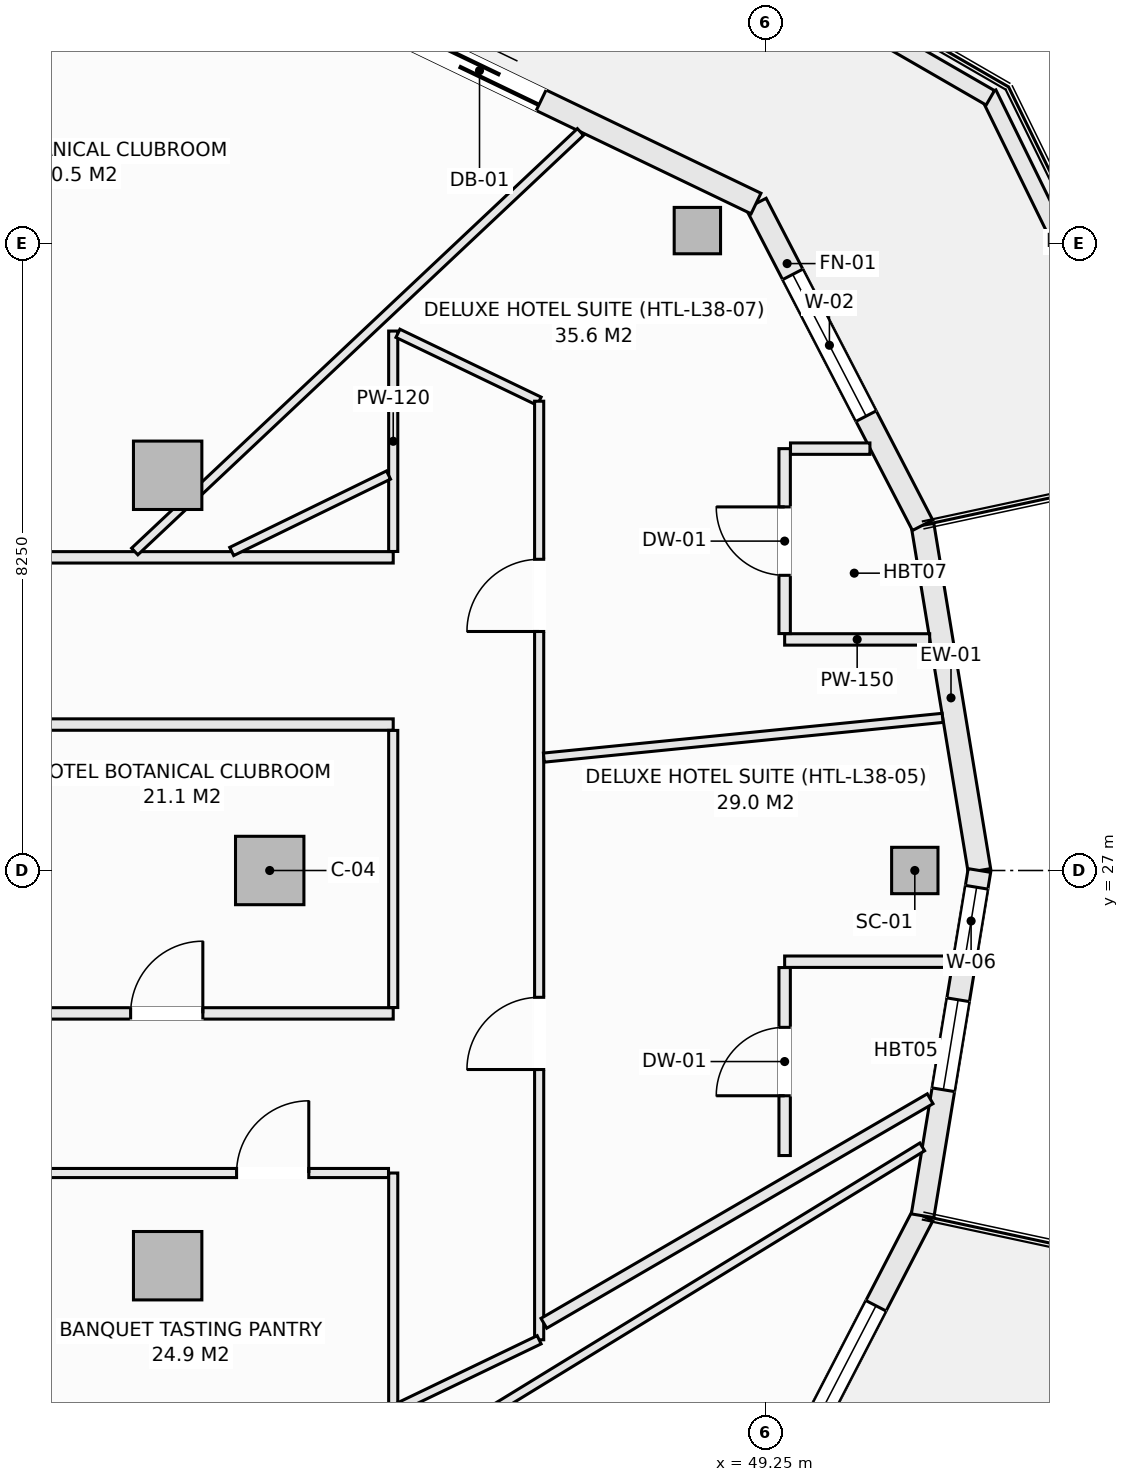
"""IFC4 building model, lengths in metres.
Left out: names, types, materials, properties, quantities, classifications, styles, units other than length and angle.
Written with IfcOpenShell. Run it as: python <this file> out.ifc"""

import sys

from ifc_helpers import new_model, si_unit, direction, frame, frame_2d, origin, origin_2d, place, context, subcontext, project, spatial, rectangle, hollow_rectangle, extrude, element, fill, save


model = new_model("IFC4")
c1 = context("Model", 3, precision=1e-05, world=origin(), true_north=direction((0.0, 1.0)))
c2 = subcontext(c1, "Body", "Model", "MODEL_VIEW")
j1 = project(units=[si_unit("LENGTHUNIT", "METRE"), si_unit("PLANEANGLEUNIT", "RADIAN")], contexts=[c1])
p1 = place(None, origin())
s1 = spatial("IfcSite", under=j1, at=p1, CompositionType="ELEMENT")
p2 = place(p1, origin())
s2 = spatial("IfcBuilding", under=s1, at=p2, CompositionType="ELEMENT")
p3 = place(p2, frame((0.0, 0.0, 149.5)))
s3 = spatial("IfcBuildingStorey", under=s2, at=p3, CompositionType="ELEMENT", Elevation=149.5)
for number, where, z_axis, x_axis in (
    (1, (51.212, 27.0, -0.27), (0.0, 0.0, 1.0), (1.0, 0.0, 0.0)),
    (2, (48.352, 35.419, -0.27), (0.0, 0.0, 1.0), (1.0, 0.0, 0.0)),
):
    element("IfcColumn", number, at=place(p3, frame(where, z_axis=z_axis, x_axis=x_axis)), inside=s3, PredefinedType="COLUMN", context=c2, shape_type="SweptSolid", body=[
        extrude(hollow_rectangle(XDim=0.61, YDim=0.61, WallThickness=0.025, at=origin_2d()), origin(), (0.0, 0.0, 1.0), 3.4),
    ])
for number, where, z_axis, x_axis in (
    (3, (42.725, 27.0, -0.27), (0.0, 0.0, 1.0), (1.0, 0.0, 0.0)),
    (4, (41.382, 32.199, -0.27), (0.0, 0.0, 1.0), (1.0, 0.0, 0.0)),
    (5, (41.382, 21.801, -0.27), (0.0, 0.0, 1.0), (1.0, 0.0, 0.0)),
):
    element("IfcColumn", number, at=place(p3, frame(where, z_axis=z_axis, x_axis=x_axis)), inside=s3, PredefinedType="COLUMN", context=c2, shape_type="SweptSolid", body=[
        extrude(rectangle(XDim=0.9, YDim=0.9, at=origin_2d()), origin(), (0.0, 0.0, 1.0), 3.4),
    ])
p4 = place(p3, frame((51.315, 31.542, 0.0), z_axis=(0.0, 0.0, 1.0), x_axis=(0.162394765401, -0.986725868806, 0.0)))
e6 = element("IfcWall", 6, at=p4, inside=s3, PredefinedType="SOLIDWALL", context=c2, shape_type="SweptSolid", body=[
    extrude(rectangle(XDim=4.603, YDim=0.3, at=frame_2d((2.302, 0.0))), origin(), (0.0, 0.0, 1.0), 2.653),
])
p5 = place(p3, frame((49.123, 35.775, 0.0), z_axis=(0.0, 0.0, 1.0), x_axis=(0.459810251451, -0.888017191647, 0.0)))
e7 = element("IfcWall", 7, at=p5, inside=s3, PredefinedType="SOLIDWALL", context=c2, shape_type="SweptSolid", body=[
    extrude(rectangle(XDim=4.766, YDim=0.3, at=frame_2d((2.383, 0.0))), origin(), (0.0, 0.0, 1.0), 2.653),
])
p6 = place(p5, frame((1.05, 0.0, 0.74)))
e8 = element("IfcOpeningElement", 8, at=p6, cuts=e7, PredefinedType="OPENING", context=c2, shape_type="SweptSolid", body=[
    extrude(rectangle(XDim=2.1, YDim=1.7, at=frame_2d((1.05, 0.85))), frame((0.0, 0.16, 0.0), z_axis=(0.0, -1.0, 0.0), x_axis=(1.0, 0.0, 0.0)), (0.0, 0.0, 1.0), 0.32),
])
p7 = place(p3, frame((44.313, 38.086, 0.0), z_axis=(0.0, 0.0, 1.0), x_axis=(0.901353070301, -0.433085029363, 0.0)))
e9 = element("IfcWall", 9, at=p7, inside=s3, PredefinedType="SOLIDWALL", context=c2, shape_type="SweptSolid", body=[
    extrude(rectangle(XDim=5.336, YDim=0.3, at=frame_2d((2.668, 0.0))), origin(), (0.0, 0.0, 1.0), 2.653),
])
p8 = place(p7, frame((0.4, 0.0, 0.0)))
e10 = element("IfcOpeningElement", 10, at=p8, cuts=e9, PredefinedType="OPENING", context=c2, shape_type="SweptSolid", body=[
    extrude(rectangle(XDim=1.8, YDim=2.25, at=frame_2d((0.9, 1.125))), frame((0.0, 0.16, 0.0), z_axis=(0.0, -1.0, 0.0), x_axis=(1.0, 0.0, 0.0)), (0.0, 0.0, 1.0), 0.32),
])
p9 = place(p3, frame((49.123, 18.225, 0.0), z_axis=(0.0, 0.0, 1.0), x_axis=(0.459810251451, 0.888017191647, 0.0)))
e11 = element("IfcWall", 11, at=p9, inside=s3, PredefinedType="SOLIDWALL", context=c2, shape_type="SweptSolid", body=[
    extrude(rectangle(XDim=4.766, YDim=0.3, at=frame_2d((2.383, 0.0))), origin(), (0.0, 0.0, 1.0), 2.653),
])
p10 = place(p9, frame((1.333, 0.0, 0.74)))
e12 = element("IfcOpeningElement", 12, at=p10, cuts=e11, PredefinedType="OPENING", context=c2, shape_type="SweptSolid", body=[
    extrude(rectangle(XDim=2.1, YDim=1.7, at=frame_2d((1.05, 0.85))), frame((0.0, 0.16, 0.0), z_axis=(0.0, -1.0, 0.0), x_axis=(1.0, 0.0, 0.0)), (0.0, 0.0, 1.0), 0.32),
])
p11 = place(p3, frame((51.315, 22.458, 0.0), z_axis=(0.0, 0.0, 1.0), x_axis=(0.162394765401, 0.986725868806, 0.0)))
e13 = element("IfcWall", 13, at=p11, inside=s3, PredefinedType="SOLIDWALL", context=c2, shape_type="SweptSolid", body=[
    extrude(rectangle(XDim=4.603, YDim=0.3, at=frame_2d((2.302, 0.0))), origin(), (0.0, 0.0, 1.0), 2.653),
])
p12 = place(p11, frame((1.68, 0.0, 0.74)))
e14 = element("IfcOpeningElement", 14, at=p12, cuts=e13, PredefinedType="OPENING", context=c2, shape_type="SweptSolid", body=[
    extrude(rectangle(XDim=1.2, YDim=1.7, at=frame_2d((0.6, 0.85))), frame((0.0, 0.16, 0.0), z_axis=(0.0, -1.0, 0.0), x_axis=(1.0, 0.0, 0.0)), (0.0, 0.0, 1.0), 0.32),
])
p13 = place(p11, frame((3.48, 0.0, 0.72)))
e15 = element("IfcOpeningElement", 15, at=p13, cuts=e13, PredefinedType="OPENING", context=c2, shape_type="SweptSolid", body=[
    extrude(rectangle(XDim=0.9, YDim=1.65, at=frame_2d((0.45, 0.825))), frame((0.0, 0.16, 0.0), z_axis=(0.0, -1.0, 0.0), x_axis=(1.0, 0.0, 0.0)), (0.0, 0.0, 1.0), 0.32),
])
p14 = place(p3, frame((52.18, 37.221, 0.0), z_axis=(0.0, 0.0, 1.0), x_axis=(0.439637174641, -0.898175458735, 0.0)))
e16 = element("IfcWall", 16, at=p14, inside=s3, PredefinedType="PARAPET", context=c2, shape_type="SweptSolid", body=[
    extrude(rectangle(XDim=5.567, YDim=0.22, at=frame_2d((2.784, 0.0))), origin(), (0.0, 0.0, 1.0), 0.52),
])
p15 = place(p3, frame((46.958, 40.195, 0.0), z_axis=(0.0, 0.0, 1.0), x_axis=(0.866058128659, -0.499943314571, 0.0)))
e17 = element("IfcWall", 17, at=p15, inside=s3, PredefinedType="PARAPET", context=c2, shape_type="SweptSolid", body=[
    extrude(rectangle(XDim=6.06, YDim=0.22, at=frame_2d((3.03, 0.0))), origin(), (0.0, 0.0, 1.0), 0.52),
])
p16 = place(p3, frame((52.18, 16.779, 0.0), z_axis=(0.0, 0.0, 1.0), x_axis=(0.439637174641, 0.898175458735, 0.0)))
e18 = element("IfcWall", 18, at=p16, inside=s3, PredefinedType="PARAPET", context=c2, shape_type="SweptSolid", body=[
    extrude(rectangle(XDim=5.567, YDim=0.22, at=frame_2d((2.784, 0.0))), origin(), (0.0, 0.0, 1.0), 0.52),
])
p17 = place(p3, frame((49.5, 30.04, 0.0), z_axis=(0.0, 0.0, 1.0), x_axis=(1.0, 0.0, 0.0)))
e19 = element("IfcWall", 19, at=p17, inside=s3, PredefinedType="PARTITIONING", context=c2, shape_type="SweptSolid", body=[
    extrude(rectangle(XDim=1.908, YDim=0.15, at=frame_2d((0.954, 0.0))), origin(), (0.0, 0.0, 1.0), 3.13),
])
p18 = place(p3, frame((29.78, 25.12, 0.0), z_axis=(0.0, 0.0, 1.0), x_axis=(1.0, 0.0, 0.0)))
e20 = element("IfcWall", 20, at=p18, inside=s3, PredefinedType="PARTITIONING", context=c2, shape_type="SweptSolid", body=[
    extrude(rectangle(XDim=14.57, YDim=0.15, at=frame_2d((7.285, 0.0))), origin(), (0.0, 0.0, 1.0), 3.13),
])
p19 = place(p18, frame((3.14, 0.0, 0.0)))
e21 = element("IfcOpeningElement", 21, at=p19, cuts=e20, PredefinedType="OPENING", context=c2, shape_type="SweptSolid", body=[
    extrude(rectangle(XDim=0.95, YDim=2.1, at=frame_2d((0.475, 1.05))), frame((0.0, 0.085, 0.0), z_axis=(0.0, -1.0, 0.0), x_axis=(1.0, 0.0, 0.0)), (0.0, 0.0, 1.0), 0.17),
])
p20 = place(p18, frame((7.445, 0.0, 0.0)))
e22 = element("IfcOpeningElement", 22, at=p20, cuts=e20, PredefinedType="OPENING", context=c2, shape_type="SweptSolid", body=[
    extrude(rectangle(XDim=0.95, YDim=2.1, at=frame_2d((0.475, 1.05))), frame((0.0, 0.085, 0.0), z_axis=(0.0, -1.0, 0.0), x_axis=(1.0, 0.0, 0.0)), (0.0, 0.0, 1.0), 0.17),
])
p21 = place(p18, frame((11.115, 0.0, 0.0)))
e23 = element("IfcOpeningElement", 23, at=p21, cuts=e20, PredefinedType="OPENING", context=c2, shape_type="SweptSolid", body=[
    extrude(rectangle(XDim=0.95, YDim=2.1, at=frame_2d((0.475, 1.05))), frame((0.0, 0.085, 0.0), z_axis=(0.0, -1.0, 0.0), x_axis=(1.0, 0.0, 0.0)), (0.0, 0.0, 1.0), 0.17),
])
p22 = place(p3, frame((30.077, 28.92, 0.0), z_axis=(0.0, 0.0, 1.0), x_axis=(1.0, 0.0, 0.0)))
e24 = element("IfcWall", 24, at=p22, inside=s3, PredefinedType="PARTITIONING", context=c2, shape_type="SweptSolid", body=[
    extrude(rectangle(XDim=14.273, YDim=0.15, at=frame_2d((7.137, 0.0))), origin(), (0.0, 0.0, 1.0), 3.13),
])
p23 = place(p3, frame((38.862, 31.12, 0.0), z_axis=(0.0, 0.0, 1.0), x_axis=(1.0, 0.0, 0.0)))
e25 = element("IfcWall", 25, at=p23, inside=s3, PredefinedType="PARTITIONING", context=c2, shape_type="SweptSolid", body=[
    extrude(rectangle(XDim=5.488, YDim=0.15, at=frame_2d((2.744, 0.0))), origin(), (0.0, 0.0, 1.0), 3.13),
])
p24 = place(p3, frame((44.35, 19.891, 0.0), z_axis=(0.0, 0.0, 1.0), x_axis=(0.0, 1.0, 0.0)))
e26 = element("IfcWall", 26, at=p24, inside=s3, PredefinedType="PARTITIONING", context=c2, shape_type="SweptSolid", body=[
    extrude(rectangle(XDim=3.129, YDim=0.12, at=frame_2d((1.564, 0.0))), origin(), (0.0, 0.0, 1.0), 3.13),
])
p25 = place(p3, frame((44.35, 25.197, 0.0), z_axis=(0.0, 0.0, 1.0), x_axis=(0.0, 1.0, 0.0)))
e27 = element("IfcWall", 27, at=p25, inside=s3, PredefinedType="PARTITIONING", context=c2, shape_type="SweptSolid", body=[
    extrude(rectangle(XDim=3.646, YDim=0.12, at=frame_2d((1.823, 0.0))), origin(), (0.0, 0.0, 1.0), 3.13),
])
p26 = place(p3, frame((44.35, 31.197, 0.0), z_axis=(0.0, 0.0, 1.0), x_axis=(0.0, 1.0, 0.0)))
e28 = element("IfcWall", 28, at=p26, inside=s3, PredefinedType="PARTITIONING", context=c2, shape_type="SweptSolid", body=[
    extrude(rectangle(XDim=2.9, YDim=0.12, at=frame_2d((1.45, 0.0))), origin(), (0.0, 0.0, 1.0), 3.13),
])
p27 = place(p3, frame((44.412, 34.067, 0.0), z_axis=(0.0, 0.0, 1.0), x_axis=(0.90128266231, -0.433231534656, 0.0)))
e29 = element("IfcWall", 29, at=p27, inside=s3, PredefinedType="PARTITIONING", context=c2, shape_type="SweptSolid", body=[
    extrude(rectangle(XDim=2.062, YDim=0.12, at=frame_2d((1.031, 0.0))), origin(), (0.0, 0.0, 1.0), 3.13),
])
p28 = place(p3, frame((46.27, 20.826, 0.0), z_axis=(0.0, 0.0, 1.0), x_axis=(0.0, 1.0, 0.0)))
e30 = element("IfcWall", 30, at=p28, inside=s3, PredefinedType="PARTITIONING", context=c2, shape_type="SweptSolid", body=[
    extrude(rectangle(XDim=12.348, YDim=0.12, at=frame_2d((6.174, 0.0))), origin(), (0.0, 0.0, 1.0), 3.13),
])
p29 = place(p28, frame((3.556, 0.0, 0.0)))
e31 = element("IfcOpeningElement", 31, at=p29, cuts=e30, PredefinedType="OPENING", context=c2, shape_type="SweptSolid", body=[
    extrude(rectangle(XDim=0.95, YDim=2.1, at=frame_2d((0.475, 1.05))), frame((0.0, 0.07, 0.0), z_axis=(0.0, -1.0, 0.0), x_axis=(1.0, 0.0, 0.0)), (0.0, 0.0, 1.0), 0.14),
])
p30 = place(p28, frame((9.318, 0.0, 0.0)))
e32 = element("IfcOpeningElement", 32, at=p30, cuts=e30, PredefinedType="OPENING", context=c2, shape_type="SweptSolid", body=[
    extrude(rectangle(XDim=0.95, YDim=2.1, at=frame_2d((0.475, 1.05))), frame((0.0, 0.07, 0.0), z_axis=(0.0, -1.0, 0.0), x_axis=(1.0, 0.0, 0.0)), (0.0, 0.0, 1.0), 0.14),
])
p31 = place(p3, frame((44.412, 19.933, 0.0), z_axis=(0.0, 0.0, 1.0), x_axis=(0.90128266231, 0.433231534656, 0.0)))
e33 = element("IfcWall", 33, at=p31, inside=s3, PredefinedType="PARTITIONING", context=c2, shape_type="SweptSolid", body=[
    extrude(rectangle(XDim=2.062, YDim=0.12, at=frame_2d((1.031, 0.0))), origin(), (0.0, 0.0, 1.0), 3.13),
])
p32 = place(p3, frame((39.0, 23.02, 0.0), z_axis=(0.0, 0.0, 1.0), x_axis=(1.0, 0.0, 0.0)))
e34 = element("IfcWall", 34, at=p32, inside=s3, PredefinedType="PARTITIONING", context=c2, shape_type="SweptSolid", body=[
    extrude(rectangle(XDim=5.288, YDim=0.12, at=frame_2d((2.644, 0.0))), origin(), (0.0, 0.0, 1.0), 3.13),
])
p33 = place(p32, frame((3.289, 0.0, 0.0)))
e35 = element("IfcOpeningElement", 35, at=p33, cuts=e34, PredefinedType="OPENING", context=c2, shape_type="SweptSolid", body=[
    extrude(rectangle(XDim=0.95, YDim=2.1, at=frame_2d((0.475, 1.05))), frame((0.0, 0.07, 0.0), z_axis=(0.0, -1.0, 0.0), x_axis=(1.0, 0.0, 0.0)), (0.0, 0.0, 1.0), 0.14),
])
p34 = place(p3, frame((46.332, 28.485, 0.0), z_axis=(0.0, 0.0, 1.0), x_axis=(0.995067863433, 0.099196507817, 0.0)))
e36 = element("IfcWall", 36, at=p34, inside=s3, PredefinedType="PARTITIONING", context=c2, shape_type="SweptSolid", body=[
    extrude(rectangle(XDim=5.272, YDim=0.12, at=frame_2d((2.636, 0.0))), origin(), (0.0, 0.0, 1.0), 3.13),
])
p35 = place(p3, frame((39.082, 15.87, 0.0), z_axis=(0.0, 0.0, 1.0), x_axis=(0.852607858044, 0.522551280165, 0.0)))
e37 = element("IfcWall", 37, at=p35, inside=s3, PredefinedType="PARTITIONING", context=c2, shape_type="SweptSolid", body=[
    extrude(rectangle(XDim=14.342, YDim=0.12, at=frame_2d((7.171, 0.0))), origin(), (0.0, 0.0, 1.0), 2.505),
])
p36 = place(p3, frame((46.332, 21.043, 0.0), z_axis=(0.0, 0.0, 1.0), x_axis=(0.864559641837, 0.502530223674, 0.0)))
e38 = element("IfcWall", 38, at=p36, inside=s3, PredefinedType="PARTITIONING", context=c2, shape_type="SweptSolid", body=[
    extrude(rectangle(XDim=5.878, YDim=0.15, at=frame_2d((2.939, 0.0))), origin(), (0.0, 0.0, 1.0), 3.13),
])
p37 = place(p3, frame((49.5, 25.8, 0.0), z_axis=(0.0, 0.0, 1.0), x_axis=(1.0, 0.0, 0.0)))
e39 = element("IfcWall", 39, at=p37, inside=s3, PredefinedType="PARTITIONING", context=c2, shape_type="SweptSolid", body=[
    extrude(rectangle(XDim=2.211, YDim=0.15, at=frame_2d((1.105, 0.0))), origin(), (0.0, 0.0, 1.0), 3.13),
])
p38 = place(p3, frame((49.5, 23.25, 0.0), z_axis=(0.0, 0.0, 1.0), x_axis=(0.0, 1.0, 0.0)))
e40 = element("IfcWall", 40, at=p38, inside=s3, PredefinedType="PARTITIONING", context=c2, shape_type="SweptSolid", body=[
    extrude(rectangle(XDim=2.473, YDim=0.15, at=frame_2d((1.236, 0.0))), origin(), (0.0, 0.0, 1.0), 3.13),
])
p39 = place(p38, frame((0.787, 0.0, 0.0)))
e41 = element("IfcOpeningElement", 41, at=p39, cuts=e40, PredefinedType="OPENING", context=c2, shape_type="SweptSolid", body=[
    extrude(rectangle(XDim=0.9, YDim=2.1, at=frame_2d((0.45, 1.05))), frame((0.0, 0.085, 0.0), z_axis=(0.0, -1.0, 0.0), x_axis=(1.0, 0.0, 0.0)), (0.0, 0.0, 1.0), 0.17),
])
p40 = place(p3, frame((49.5, 30.117, 0.0), z_axis=(0.0, 0.0, 1.0), x_axis=(0.0, 1.0, 0.0)))
e42 = element("IfcWall", 42, at=p40, inside=s3, PredefinedType="PARTITIONING", context=c2, shape_type="SweptSolid", body=[
    extrude(rectangle(XDim=2.433, YDim=0.15, at=frame_2d((1.217, 0.0))), origin(), (0.0, 0.0, 1.0), 2.653),
])
p41 = place(p40, frame((0.767, 0.0, 0.0)))
e43 = element("IfcOpeningElement", 43, at=p41, cuts=e42, PredefinedType="OPENING", context=c2, shape_type="SweptSolid", body=[
    extrude(rectangle(XDim=0.9, YDim=2.1, at=frame_2d((0.45, 1.05))), frame((0.0, 0.085, 0.0), z_axis=(0.0, -1.0, 0.0), x_axis=(1.0, 0.0, 0.0)), (0.0, 0.0, 1.0), 0.17),
])
p42 = place(p3, frame((49.577, 32.55, 0.0), z_axis=(0.0, 0.0, 1.0), x_axis=(1.0, 0.0, 0.0)))
e44 = element("IfcWall", 44, at=p42, inside=s3, PredefinedType="PARTITIONING", context=c2, shape_type="SweptSolid", body=[
    extrude(rectangle(XDim=1.045, YDim=0.15, at=frame_2d((0.522, 0.0))), origin(), (0.0, 0.0, 1.0), 3.13),
])
p43 = place(p3, frame((42.225, 31.197, 0.0), z_axis=(0.0, 0.0, 1.0), x_axis=(0.898870643835, 0.438214063732, 0.0)))
e45 = element("IfcWall", 45, at=p43, inside=s3, PredefinedType="PARTITIONING", context=c2, shape_type="SweptSolid", body=[
    extrude(rectangle(XDim=2.295, YDim=0.12, at=frame_2d((1.148, 0.0))), origin(), (0.0, 0.0, 1.0), 3.13),
])
p44 = place(p3, frame((40.949, 31.197, 0.0), z_axis=(0.0, 0.0, 1.0), x_axis=(0.728258728927, 0.685302286397, 0.0)))
e46 = element("IfcWall", 46, at=p44, inside=s3, PredefinedType="PARTITIONING", context=c2, shape_type="SweptSolid", body=[
    extrude(rectangle(XDim=8.053, YDim=0.12, at=frame_2d((4.027, 0.0))), origin(), (0.0, 0.0, 1.0), 2.812),
])
p45 = place(p3, frame((34.112, 36.482, 0.0), z_axis=(0.0, 0.0, 1.0), x_axis=(0.92763911586, 0.373477804863, 0.0)))
e47 = element("IfcWall", 47, at=p45, inside=s3, PredefinedType="PARTITIONING", context=c2, shape_type="SweptSolid", body=[
    extrude(rectangle(XDim=9.233, YDim=0.12, at=frame_2d((4.616, 0.0))), origin(), (0.0, 0.0, 1.0), 2.505),
])
p46 = place(p6, origin())
e48 = element("IfcWindow", 48, at=p46, inside=s3, PartitioningType="SINGLE_PANEL", PredefinedType="WINDOW", context=c2, shape_type="SweptSolid", body=[
    extrude(rectangle(XDim=2.1, YDim=1.7, at=frame_2d((1.05, 0.85))), frame((0.0, 0.03, 0.0), z_axis=(0.0, -1.0, 0.0), x_axis=(1.0, 0.0, 0.0)), (0.0, 0.0, 1.0), 0.06),
])
fill(e8, e48)
p47 = place(p8, origin())
e49 = element("IfcDoor", 49, at=p47, inside=s3, OperationType="SLIDING_TO_LEFT", PredefinedType="DOOR", context=c2, shape_type="SweptSolid", body=[
    extrude(rectangle(XDim=1.8, YDim=2.25, at=frame_2d((0.9, 1.125))), frame((0.0, 0.025, 0.0), z_axis=(0.0, -1.0, 0.0), x_axis=(1.0, 0.0, 0.0)), (0.0, 0.0, 1.0), 0.05),
])
fill(e10, e49)
p48 = place(p10, origin())
e50 = element("IfcWindow", 50, at=p48, inside=s3, PartitioningType="SINGLE_PANEL", PredefinedType="WINDOW", context=c2, shape_type="SweptSolid", body=[
    extrude(rectangle(XDim=2.1, YDim=1.7, at=frame_2d((1.05, 0.85))), frame((0.0, 0.03, 0.0), z_axis=(0.0, -1.0, 0.0), x_axis=(1.0, 0.0, 0.0)), (0.0, 0.0, 1.0), 0.06),
])
fill(e12, e50)
p49 = place(p12, origin())
e51 = element("IfcWindow", 51, at=p49, inside=s3, PartitioningType="SINGLE_PANEL", PredefinedType="WINDOW", context=c2, shape_type="SweptSolid", body=[
    extrude(rectangle(XDim=1.2, YDim=1.7, at=frame_2d((0.6, 0.85))), frame((0.0, 0.03, 0.0), z_axis=(0.0, -1.0, 0.0), x_axis=(1.0, 0.0, 0.0)), (0.0, 0.0, 1.0), 0.06),
])
fill(e14, e51)
p50 = place(p33, origin())
e52 = element("IfcDoor", 52, at=p50, inside=s3, OperationType="SINGLE_SWING_RIGHT", PredefinedType="DOOR", context=c2, shape_type="SweptSolid", body=[
    extrude(rectangle(XDim=0.95, YDim=2.1, at=frame_2d((0.475, 1.05))), frame((0.0, 0.025, 0.0), z_axis=(0.0, -1.0, 0.0), x_axis=(1.0, 0.0, 0.0)), (0.0, 0.0, 1.0), 0.05),
])
fill(e35, e52)
p51 = place(p29, origin())
e53 = element("IfcDoor", 53, at=p51, inside=s3, OperationType="SINGLE_SWING_LEFT", PredefinedType="DOOR", context=c2, shape_type="SweptSolid", body=[
    extrude(rectangle(XDim=0.95, YDim=2.1, at=frame_2d((0.475, 1.05))), frame((0.0, 0.025, 0.0), z_axis=(0.0, -1.0, 0.0), x_axis=(1.0, 0.0, 0.0)), (0.0, 0.0, 1.0), 0.05),
])
fill(e31, e53)
p52 = place(p21, origin())
e54 = element("IfcDoor", 54, at=p52, inside=s3, OperationType="SINGLE_SWING_RIGHT", PredefinedType="DOOR", context=c2, shape_type="SweptSolid", body=[
    extrude(rectangle(XDim=0.95, YDim=2.1, at=frame_2d((0.475, 1.05))), frame((0.0, 0.025, 0.0), z_axis=(0.0, -1.0, 0.0), x_axis=(1.0, 0.0, 0.0)), (0.0, 0.0, 1.0), 0.05),
])
fill(e23, e54)
p53 = place(p30, origin())
e55 = element("IfcDoor", 55, at=p53, inside=s3, OperationType="SINGLE_SWING_LEFT", PredefinedType="DOOR", context=c2, shape_type="SweptSolid", body=[
    extrude(rectangle(XDim=0.95, YDim=2.1, at=frame_2d((0.475, 1.05))), frame((0.0, 0.025, 0.0), z_axis=(0.0, -1.0, 0.0), x_axis=(1.0, 0.0, 0.0)), (0.0, 0.0, 1.0), 0.05),
])
fill(e32, e55)
p54 = place(p39, origin())
e56 = element("IfcDoor", 56, at=p54, inside=s3, OperationType="SINGLE_SWING_LEFT", PredefinedType="DOOR", context=c2, shape_type="SweptSolid", body=[
    extrude(rectangle(XDim=0.9, YDim=2.1, at=frame_2d((0.45, 1.05))), frame((0.0, 0.025, 0.0), z_axis=(0.0, -1.0, 0.0), x_axis=(1.0, 0.0, 0.0)), (0.0, 0.0, 1.0), 0.05),
])
fill(e41, e56)
p55 = place(p41, origin())
e57 = element("IfcDoor", 57, at=p55, inside=s3, OperationType="SINGLE_SWING_RIGHT", PredefinedType="DOOR", context=c2, shape_type="SweptSolid", body=[
    extrude(rectangle(XDim=0.9, YDim=2.1, at=frame_2d((0.45, 1.05))), frame((0.0, 0.025, 0.0), z_axis=(0.0, -1.0, 0.0), x_axis=(1.0, 0.0, 0.0)), (0.0, 0.0, 1.0), 0.05),
])
fill(e43, e57)
p56 = place(p13, origin())
e58 = element("IfcWindow", 58, at=p56, inside=s3, PartitioningType="SINGLE_PANEL", PredefinedType="WINDOW", context=c2, shape_type="SweptSolid", body=[
    extrude(rectangle(XDim=0.9, YDim=1.65, at=frame_2d((0.45, 0.825))), frame((0.0, 0.03, 0.0), z_axis=(0.0, -1.0, 0.0), x_axis=(1.0, 0.0, 0.0)), (0.0, 0.0, 1.0), 0.06),
])
fill(e15, e58)
save(model, sys.argv[1])
